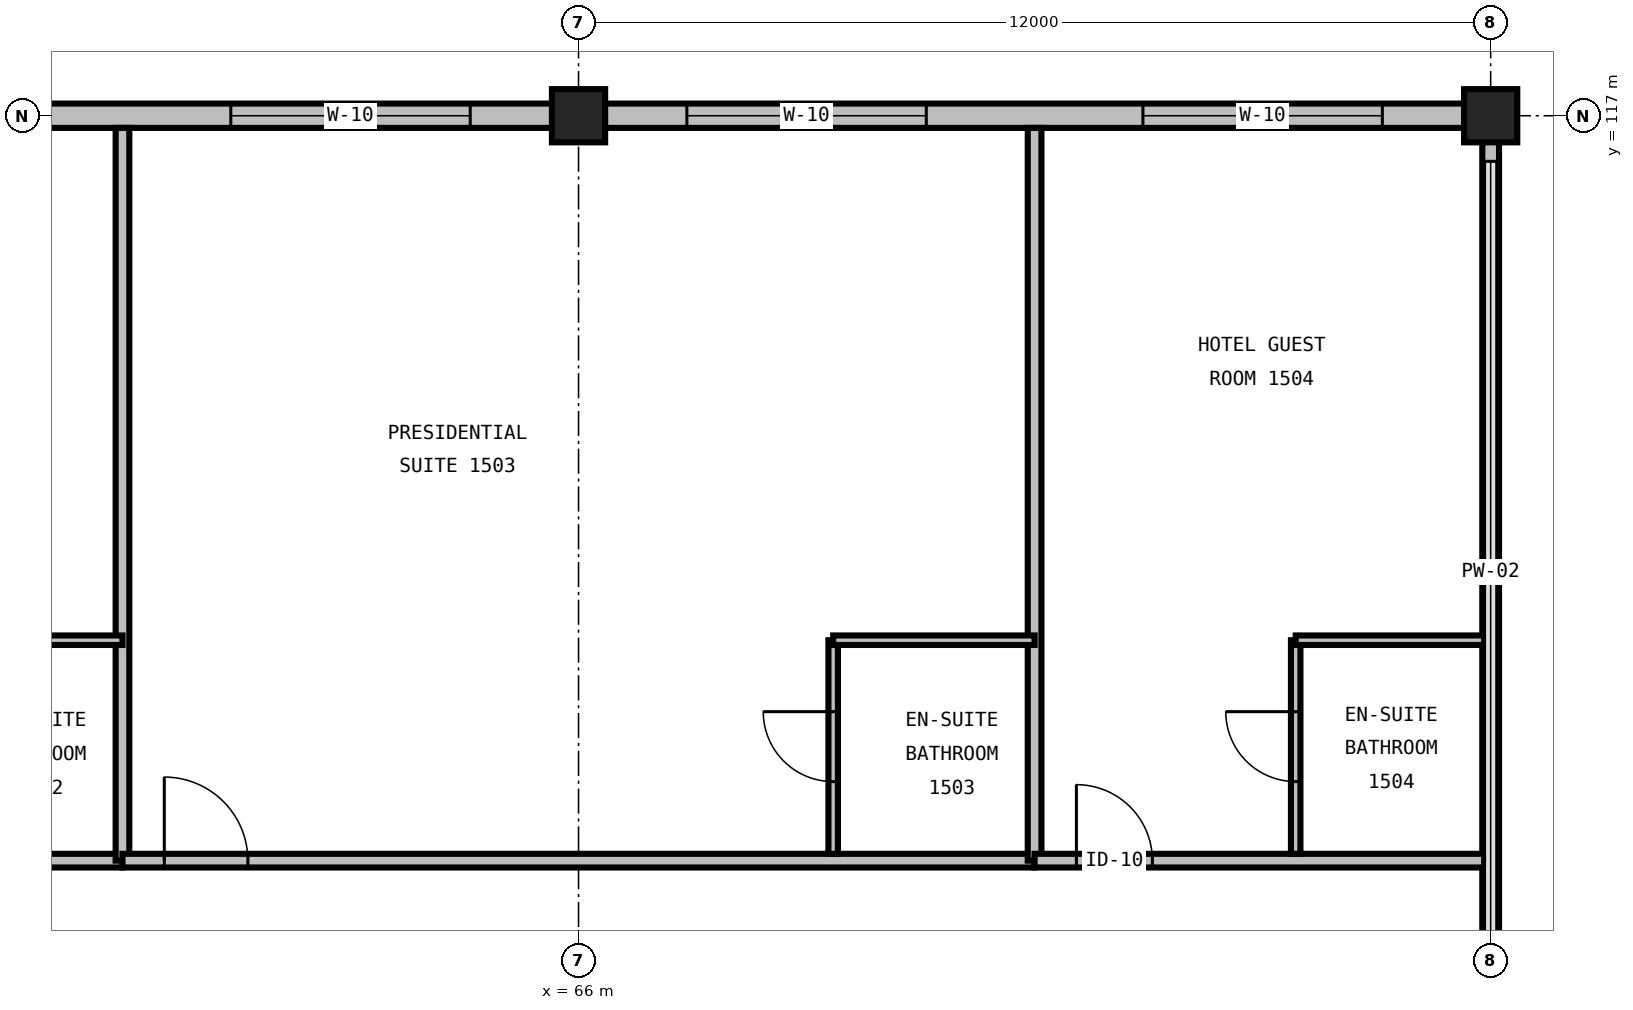
"""IFC4 building model, lengths in metres.
Left out: names, types, materials, properties, quantities, classifications, styles, units other than length and angle.
Written with IfcOpenShell. Run it as: python <this file> out.ifc"""

import sys

from ifc_helpers import new_model, si_unit, direction, frame, frame_2d, origin, origin_2d, place, context, subcontext, project, spatial, rectangle, extrude, element, fill, save


model = new_model("IFC4")
c1 = context("Model", 3, precision=1e-05, world=origin(), true_north=direction((0.0, 1.0)))
c2 = subcontext(c1, "Body", "Model", "MODEL_VIEW")
j1 = project(units=[si_unit("LENGTHUNIT", "METRE"), si_unit("PLANEANGLEUNIT", "RADIAN")], contexts=[c1])
p1 = place(None, origin())
s1 = spatial("IfcSite", under=j1, at=p1, CompositionType="ELEMENT")
p2 = place(p1, origin())
s2 = spatial("IfcBuilding", under=s1, at=p2, CompositionType="ELEMENT")
p3 = place(p2, frame((0.0, 0.0, 63.6)))
s3 = spatial("IfcBuildingStorey", under=s2, at=p3, CompositionType="ELEMENT", Elevation=63.6)
for number, where, z_axis, x_axis in (
    (1, (66.0, 117.0, 0.0), (0.0, 0.0, 1.0), (1.0, 0.0, 0.0)),
    (2, (78.0, 117.0, 0.0), (0.0, 0.0, 1.0), (1.0, 0.0, 0.0)),
):
    element("IfcColumn", number, at=place(p3, frame(where, z_axis=z_axis, x_axis=x_axis)), inside=s3, PredefinedType="COLUMN", context=c2, shape_type="SweptSolid", body=[
        extrude(rectangle(XDim=0.7, YDim=0.7, at=origin_2d()), origin(), (0.0, 0.0, 1.0), 3.6),
    ])
p4 = place(p3, frame((66.0, 117.0, 0.0), z_axis=(0.0, 0.0, 1.0), x_axis=(-1.0, 0.0, 0.0)))
e3 = element("IfcWall", 3, at=p4, inside=s3, PredefinedType="STANDARD", context=c2, shape_type="SweptSolid", body=[
    extrude(rectangle(XDim=12.0, YDim=0.32, at=frame_2d((6.0, 0.0))), origin(), (0.0, 0.0, 1.0), 2.536),
])
p5 = place(p4, frame((1.425, 0.0, 0.65)))
e4 = element("IfcOpeningElement", 4, at=p5, cuts=e3, PredefinedType="OPENING", context=c2, shape_type="SweptSolid", body=[
    extrude(rectangle(XDim=3.15, YDim=1.75, at=frame_2d((1.575, 0.875))), frame((0.0, 0.175, 0.0), z_axis=(0.0, -1.0, 0.0), x_axis=(1.0, 0.0, 0.0)), (0.0, 0.0, 1.0), 0.35),
])
p6 = place(p4, frame((7.425, 0.0, 0.65)))
e5 = element("IfcOpeningElement", 5, at=p6, cuts=e3, PredefinedType="OPENING", context=c2, shape_type="SweptSolid", body=[
    extrude(rectangle(XDim=3.15, YDim=1.75, at=frame_2d((1.575, 0.875))), frame((0.0, 0.175, 0.0), z_axis=(0.0, -1.0, 0.0), x_axis=(1.0, 0.0, 0.0)), (0.0, 0.0, 1.0), 0.35),
])
p7 = place(p3, frame((78.0, 117.0, 0.0), z_axis=(0.0, 0.0, 1.0), x_axis=(-1.0, 0.0, 0.0)))
e6 = element("IfcWall", 6, at=p7, inside=s3, PredefinedType="STANDARD", context=c2, shape_type="SweptSolid", body=[
    extrude(rectangle(XDim=12.0, YDim=0.32, at=frame_2d((6.0, 0.0))), origin(), (0.0, 0.0, 1.0), 2.536),
])
p8 = place(p7, frame((1.425, 0.0, 0.65)))
e7 = element("IfcOpeningElement", 7, at=p8, cuts=e6, PredefinedType="OPENING", context=c2, shape_type="SweptSolid", body=[
    extrude(rectangle(XDim=3.15, YDim=1.75, at=frame_2d((1.575, 0.875))), frame((0.0, 0.175, 0.0), z_axis=(0.0, -1.0, 0.0), x_axis=(1.0, 0.0, 0.0)), (0.0, 0.0, 1.0), 0.35),
])
p9 = place(p7, frame((7.425, 0.0, 0.65)))
e8 = element("IfcOpeningElement", 8, at=p9, cuts=e6, PredefinedType="OPENING", context=c2, shape_type="SweptSolid", body=[
    extrude(rectangle(XDim=3.15, YDim=1.75, at=frame_2d((1.575, 0.875))), frame((0.0, 0.175, 0.0), z_axis=(0.0, -1.0, 0.0), x_axis=(1.0, 0.0, 0.0)), (0.0, 0.0, 1.0), 0.35),
])
p10 = place(p3, frame((78.0, 105.0, 0.0), z_axis=(0.0, 0.0, 1.0), x_axis=(0.0, 1.0, 0.0)))
e9 = element("IfcWall", 9, at=p10, inside=s3, PredefinedType="PARAPET", context=c2, shape_type="SweptSolid", body=[
    extrude(rectangle(XDim=12.0, YDim=0.22, at=frame_2d((6.0, 0.0))), origin(), (0.0, 0.0, 1.0), 0.2),
])
p11 = place(p3, frame((48.0, 107.2, 0.0), z_axis=(0.0, 0.0, 1.0), x_axis=(1.0, 0.0, 0.0)))
e10 = element("IfcWall", 10, at=p11, inside=s3, PredefinedType="PARTITIONING", context=c2, shape_type="SweptSolid", body=[
    extrude(rectangle(XDim=12.0, YDim=0.18, at=frame_2d((6.0, 0.0))), origin(), (0.0, 0.0, 1.0), 3.29),
])
p12 = place(p11, frame((0.55, 0.0, 0.0)))
e11 = element("IfcOpeningElement", 11, at=p12, cuts=e10, PredefinedType="OPENING", context=c2, shape_type="SweptSolid", body=[
    extrude(rectangle(XDim=1.1, YDim=2.2, at=frame_2d((0.55, 1.1))), frame((0.0, 0.105, 0.0), z_axis=(0.0, -1.0, 0.0), x_axis=(1.0, 0.0, 0.0)), (0.0, 0.0, 1.0), 0.21),
])
p13 = place(p3, frame((60.0, 107.2, 0.0), z_axis=(0.0, 0.0, 1.0), x_axis=(0.0, 1.0, 0.0)))
e12 = element("IfcWall", 12, at=p13, inside=s3, PredefinedType="PARTITIONING", context=c2, shape_type="SweptSolid", body=[
    extrude(rectangle(XDim=9.64, YDim=0.18, at=frame_2d((4.82, 0.0))), origin(), (0.0, 0.0, 1.0), 3.29),
])
p14 = place(p3, frame((57.35, 110.1, 0.0), z_axis=(0.0, 0.0, 1.0), x_axis=(1.0, 0.0, 0.0)))
e13 = element("IfcWall", 13, at=p14, inside=s3, PredefinedType="PARTITIONING", context=c2, shape_type="SweptSolid", body=[
    extrude(rectangle(XDim=2.65, YDim=0.125, at=frame_2d((1.325, 0.0))), origin(), (0.0, 0.0, 1.0), 3.29),
])
p15 = place(p3, frame((60.0, 107.2, 0.0), z_axis=(0.0, 0.0, 1.0), x_axis=(1.0, 0.0, 0.0)))
e14 = element("IfcWall", 14, at=p15, inside=s3, PredefinedType="PARTITIONING", context=c2, shape_type="SweptSolid", body=[
    extrude(rectangle(XDim=12.0, YDim=0.18, at=frame_2d((6.0, 0.0))), origin(), (0.0, 0.0, 1.0), 3.29),
])
p16 = place(p15, frame((0.55, 0.0, 0.0)))
e15 = element("IfcOpeningElement", 15, at=p16, cuts=e14, PredefinedType="OPENING", context=c2, shape_type="SweptSolid", body=[
    extrude(rectangle(XDim=1.1, YDim=2.2, at=frame_2d((0.55, 1.1))), frame((0.0, 0.105, 0.0), z_axis=(0.0, -1.0, 0.0), x_axis=(1.0, 0.0, 0.0)), (0.0, 0.0, 1.0), 0.21),
])
p17 = place(p3, frame((72.0, 107.2, 0.0), z_axis=(0.0, 0.0, 1.0), x_axis=(0.0, 1.0, 0.0)))
e16 = element("IfcWall", 16, at=p17, inside=s3, PredefinedType="PARTITIONING", context=c2, shape_type="SweptSolid", body=[
    extrude(rectangle(XDim=9.64, YDim=0.18, at=frame_2d((4.82, 0.0))), origin(), (0.0, 0.0, 1.0), 3.29),
])
p18 = place(p3, frame((69.35, 107.29, 0.0), z_axis=(0.0, 0.0, 1.0), x_axis=(0.0, 1.0, 0.0)))
e17 = element("IfcWall", 17, at=p18, inside=s3, PredefinedType="PARTITIONING", context=c2, shape_type="SweptSolid", body=[
    extrude(rectangle(XDim=2.81, YDim=0.125, at=frame_2d((1.405, 0.0))), origin(), (0.0, 0.0, 1.0), 3.29),
])
p19 = place(p18, frame((0.95, 0.0, 0.0)))
e18 = element("IfcOpeningElement", 18, at=p19, cuts=e17, PredefinedType="OPENING", context=c2, shape_type="SweptSolid", body=[
    extrude(rectangle(XDim=0.92, YDim=2.1, at=frame_2d((0.46, 1.05))), frame((0.0, 0.077, 0.0), z_axis=(0.0, -1.0, 0.0), x_axis=(1.0, 0.0, 0.0)), (0.0, 0.0, 1.0), 0.155),
])
p20 = place(p3, frame((69.35, 110.1, 0.0), z_axis=(0.0, 0.0, 1.0), x_axis=(1.0, 0.0, 0.0)))
e19 = element("IfcWall", 19, at=p20, inside=s3, PredefinedType="PARTITIONING", context=c2, shape_type="SweptSolid", body=[
    extrude(rectangle(XDim=2.65, YDim=0.125, at=frame_2d((1.325, 0.0))), origin(), (0.0, 0.0, 1.0), 3.29),
])
p21 = place(p3, frame((72.0, 107.2, 0.0), z_axis=(0.0, 0.0, 1.0), x_axis=(1.0, 0.0, 0.0)))
e20 = element("IfcWall", 20, at=p21, inside=s3, PredefinedType="PARTITIONING", context=c2, shape_type="SweptSolid", body=[
    extrude(rectangle(XDim=5.915, YDim=0.18, at=frame_2d((2.957, 0.0))), origin(), (0.0, 0.0, 1.0), 3.29),
])
p22 = place(p21, frame((0.55, 0.0, 0.0)))
e21 = element("IfcOpeningElement", 21, at=p22, cuts=e20, PredefinedType="OPENING", context=c2, shape_type="SweptSolid", body=[
    extrude(rectangle(XDim=1.0, YDim=2.15, at=frame_2d((0.5, 1.075))), frame((0.0, 0.105, 0.0), z_axis=(0.0, -1.0, 0.0), x_axis=(1.0, 0.0, 0.0)), (0.0, 0.0, 1.0), 0.21),
])
p23 = place(p3, frame((75.435, 107.29, 0.0), z_axis=(0.0, 0.0, 1.0), x_axis=(0.0, 1.0, 0.0)))
e22 = element("IfcWall", 22, at=p23, inside=s3, PredefinedType="PARTITIONING", context=c2, shape_type="SweptSolid", body=[
    extrude(rectangle(XDim=2.81, YDim=0.125, at=frame_2d((1.405, 0.0))), origin(), (0.0, 0.0, 1.0), 3.29),
])
p24 = place(p23, frame((0.95, 0.0, 0.0)))
e23 = element("IfcOpeningElement", 23, at=p24, cuts=e22, PredefinedType="OPENING", context=c2, shape_type="SweptSolid", body=[
    extrude(rectangle(XDim=0.92, YDim=2.1, at=frame_2d((0.46, 1.05))), frame((0.0, 0.077, 0.0), z_axis=(0.0, -1.0, 0.0), x_axis=(1.0, 0.0, 0.0)), (0.0, 0.0, 1.0), 0.155),
])
p25 = place(p3, frame((75.435, 110.1, 0.0), z_axis=(0.0, 0.0, 1.0), x_axis=(1.0, 0.0, 0.0)))
e24 = element("IfcWall", 24, at=p25, inside=s3, PredefinedType="PARTITIONING", context=c2, shape_type="SweptSolid", body=[
    extrude(rectangle(XDim=2.48, YDim=0.125, at=frame_2d((1.24, 0.0))), origin(), (0.0, 0.0, 1.0), 3.29),
])
p26 = place(p5, origin())
e25 = element("IfcWindow", 25, at=p26, inside=s3, PartitioningType="TRIPLE_PANEL_VERTICAL", PredefinedType="WINDOW", context=c2, shape_type="SweptSolid", body=[
    extrude(rectangle(XDim=3.15, YDim=1.75, at=frame_2d((1.575, 0.875))), frame((0.0, 0.03, 0.0), z_axis=(0.0, -1.0, 0.0), x_axis=(1.0, 0.0, 0.0)), (0.0, 0.0, 1.0), 0.06),
])
fill(e4, e25)
p27 = place(p8, origin())
e26 = element("IfcWindow", 26, at=p27, inside=s3, PartitioningType="TRIPLE_PANEL_VERTICAL", PredefinedType="WINDOW", context=c2, shape_type="SweptSolid", body=[
    extrude(rectangle(XDim=3.15, YDim=1.75, at=frame_2d((1.575, 0.875))), frame((0.0, 0.03, 0.0), z_axis=(0.0, -1.0, 0.0), x_axis=(1.0, 0.0, 0.0)), (0.0, 0.0, 1.0), 0.06),
])
fill(e7, e26)
p28 = place(p9, origin())
e27 = element("IfcWindow", 27, at=p28, inside=s3, PartitioningType="TRIPLE_PANEL_VERTICAL", PredefinedType="WINDOW", context=c2, shape_type="SweptSolid", body=[
    extrude(rectangle(XDim=3.15, YDim=1.75, at=frame_2d((1.575, 0.875))), frame((0.0, 0.03, 0.0), z_axis=(0.0, -1.0, 0.0), x_axis=(1.0, 0.0, 0.0)), (0.0, 0.0, 1.0), 0.06),
])
fill(e8, e27)
p29 = place(p16, origin())
e28 = element("IfcDoor", 28, at=p29, inside=s3, OperationType="SINGLE_SWING_LEFT", PredefinedType="DOOR", context=c2, shape_type="SweptSolid", body=[
    extrude(rectangle(XDim=1.1, YDim=2.2, at=frame_2d((0.55, 1.1))), frame((0.0, 0.025, 0.0), z_axis=(0.0, -1.0, 0.0), x_axis=(1.0, 0.0, 0.0)), (0.0, 0.0, 1.0), 0.05),
])
fill(e15, e28)
p30 = place(p19, origin())
e29 = element("IfcDoor", 29, at=p30, inside=s3, OperationType="SINGLE_SWING_RIGHT", PredefinedType="DOOR", context=c2, shape_type="SweptSolid", body=[
    extrude(rectangle(XDim=0.92, YDim=2.1, at=frame_2d((0.46, 1.05))), frame((0.0, 0.025, 0.0), z_axis=(0.0, -1.0, 0.0), x_axis=(1.0, 0.0, 0.0)), (0.0, 0.0, 1.0), 0.05),
])
fill(e18, e29)
p31 = place(p22, origin())
e30 = element("IfcDoor", 30, at=p31, inside=s3, OperationType="SINGLE_SWING_LEFT", PredefinedType="DOOR", context=c2, shape_type="SweptSolid", body=[
    extrude(rectangle(XDim=1.0, YDim=2.15, at=frame_2d((0.5, 1.075))), frame((0.0, 0.025, 0.0), z_axis=(0.0, -1.0, 0.0), x_axis=(1.0, 0.0, 0.0)), (0.0, 0.0, 1.0), 0.05),
])
fill(e21, e30)
p32 = place(p24, origin())
e31 = element("IfcDoor", 31, at=p32, inside=s3, OperationType="SINGLE_SWING_RIGHT", PredefinedType="DOOR", context=c2, shape_type="SweptSolid", body=[
    extrude(rectangle(XDim=0.92, YDim=2.1, at=frame_2d((0.46, 1.05))), frame((0.0, 0.025, 0.0), z_axis=(0.0, -1.0, 0.0), x_axis=(1.0, 0.0, 0.0)), (0.0, 0.0, 1.0), 0.05),
])
fill(e23, e31)
save(model, sys.argv[1])
